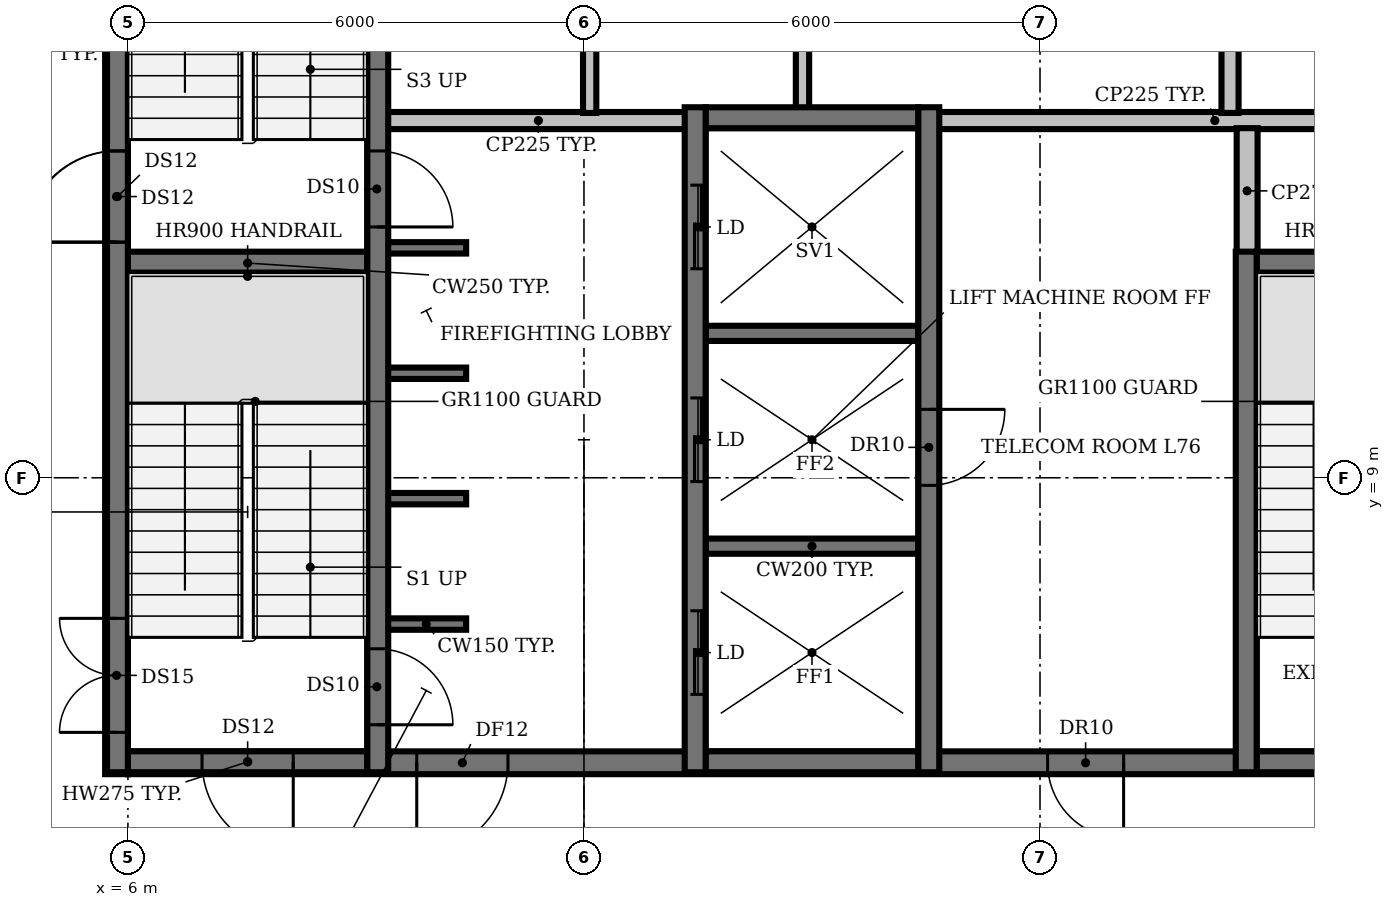
"""IFC4 building model, lengths in metres.
Left out: names, types, materials, properties, quantities, classifications, styles, units other than length and angle.
Written with IfcOpenShell. Run it as: python <this file> out.ifc"""

import sys

from ifc_helpers import new_model, si_unit, direction, frame, frame_2d, origin, place, context, subcontext, project, spatial, rectangle, extrude, element, fill, save


model = new_model("IFC4")
c1 = context("Model", 3, precision=1e-05, world=origin(), true_north=direction((0.0, 1.0)))
c2 = subcontext(c1, "Body", "Model", "MODEL_VIEW")
j1 = project(units=[si_unit("LENGTHUNIT", "METRE"), si_unit("PLANEANGLEUNIT", "RADIAN")], contexts=[c1])
p1 = place(None, origin())
s1 = spatial("IfcSite", under=j1, at=p1, CompositionType="ELEMENT")
p2 = place(p1, origin())
s2 = spatial("IfcBuilding", under=s1, at=p2, CompositionType="ELEMENT")
p3 = place(p2, frame((0.0, 0.0, 339.8)))
s3 = spatial("IfcBuildingStorey", under=s2, at=p3, CompositionType="ELEMENT", Elevation=339.8)
p4 = place(p3, frame((9.4, 7.075, 0.0), z_axis=(0.0, 0.0, 1.0), x_axis=(1.0, 0.0, 0.0)))
e1 = element("IfcWall", 1, at=p4, inside=s3, PredefinedType="SHEAR", context=c2, shape_type="SweptSolid", body=[
    extrude(rectangle(XDim=1.05, YDim=0.15, at=frame_2d((0.525, 0.0))), origin(), (0.0, 0.0, 1.0), 3.9),
])
p5 = place(p3, frame((13.6, 8.1, 0.0), z_axis=(0.0, 0.0, 1.0), x_axis=(1.0, 0.0, 0.0)))
e2 = element("IfcWall", 2, at=p5, inside=s3, PredefinedType="SHEAR", context=c2, shape_type="SweptSolid", body=[
    extrude(rectangle(XDim=2.8, YDim=0.2, at=frame_2d((1.4, 0.0))), origin(), (0.0, 0.0, 1.0), 3.9),
])
for number, where, z_axis, x_axis in (
    (3, (9.4, 8.725, 0.0), (0.0, 0.0, 1.0), (1.0, 0.0, 0.0)),
    (4, (9.4, 10.375, 0.0), (0.0, 0.0, 1.0), (1.0, 0.0, 0.0)),
):
    element("IfcWall", number, at=place(p3, frame(where, z_axis=z_axis, x_axis=x_axis)), inside=s3, PredefinedType="SHEAR", context=c2, shape_type="SweptSolid", body=[
        extrude(rectangle(XDim=1.05, YDim=0.15, at=frame_2d((0.525, 0.0))), origin(), (0.0, 0.0, 1.0), 3.9),
    ])
p6 = place(p3, frame((13.6, 10.9, 0.0), z_axis=(0.0, 0.0, 1.0), x_axis=(1.0, 0.0, 0.0)))
e5 = element("IfcWall", 5, at=p6, inside=s3, PredefinedType="SHEAR", context=c2, shape_type="SweptSolid", body=[
    extrude(rectangle(XDim=2.8, YDim=0.2, at=frame_2d((1.4, 0.0))), origin(), (0.0, 0.0, 1.0), 3.9),
])
for number, where, z_axis, x_axis in (
    (6, (6.0, 11.825, 0.0), (0.0, 0.0, 1.0), (1.0, 0.0, 0.0)),
    (7, (20.85, 11.825, 0.0), (0.0, 0.0, 1.0), (1.0, 0.0, 0.0)),
):
    element("IfcWall", number, at=place(p3, frame(where, z_axis=z_axis, x_axis=x_axis)), inside=s3, PredefinedType="SHEAR", context=c2, shape_type="SweptSolid", body=[
        extrude(rectangle(XDim=3.15, YDim=0.25, at=frame_2d((1.575, 0.0))), origin(), (0.0, 0.0, 1.0), 3.9),
    ])
p7 = place(p3, frame((9.4, 12.025, 0.0), z_axis=(0.0, 0.0, 1.0), x_axis=(1.0, 0.0, 0.0)))
e8 = element("IfcWall", 8, at=p7, inside=s3, PredefinedType="SHEAR", context=c2, shape_type="SweptSolid", body=[
    extrude(rectangle(XDim=1.05, YDim=0.15, at=frame_2d((0.525, 0.0))), origin(), (0.0, 0.0, 1.0), 3.9),
])
p8 = place(p3, frame((9.4, 13.7, 0.0), z_axis=(0.0, 0.0, 1.0), x_axis=(1.0, 0.0, 0.0)))
e9 = element("IfcWall", 9, at=p8, inside=s3, PredefinedType="PARTITIONING", context=c2, shape_type="SweptSolid", body=[
    extrude(rectangle(XDim=4.0, YDim=0.225, at=frame_2d((2.0, 0.0))), origin(), (0.0, 0.0, 1.0), 3.9),
])
p9 = place(p3, frame((13.6, 13.7, 0.0), z_axis=(0.0, 0.0, 1.0), x_axis=(1.0, 0.0, 0.0)))
e10 = element("IfcWall", 10, at=p9, inside=s3, PredefinedType="SHEAR", context=c2, shape_type="SweptSolid", body=[
    extrude(rectangle(XDim=2.8, YDim=0.2, at=frame_2d((1.4, 0.0))), origin(), (0.0, 0.0, 1.0), 3.9),
])
p10 = place(p3, frame((16.6, 13.7, 0.0), z_axis=(0.0, 0.0, 1.0), x_axis=(1.0, 0.0, 0.0)))
e11 = element("IfcWall", 11, at=p10, inside=s3, PredefinedType="PARTITIONING", context=c2, shape_type="SweptSolid", body=[
    extrude(rectangle(XDim=7.4, YDim=0.225, at=frame_2d((3.7, 0.0))), origin(), (0.0, 0.0, 1.0), 3.9),
])
p11 = place(p3, frame((9.275, 11.825, 0.0), z_axis=(0.0, 0.0, 1.0), x_axis=(0.0, -1.0, 0.0)))
e12 = element("IfcWall", 12, at=p11, inside=s3, PredefinedType="SHEAR", context=c2, shape_type="SweptSolid", body=[
    extrude(rectangle(XDim=6.425, YDim=0.25, at=frame_2d((3.212, 0.0))), origin(), (0.0, 0.0, 1.0), 3.9),
])
p12 = place(p11, frame((5.075, 0.0, 0.0)))
e13 = element("IfcOpeningElement", 13, at=p12, cuts=e12, PredefinedType="OPENING", context=c2, shape_type="SweptSolid", body=[
    extrude(rectangle(XDim=1.0, YDim=2.1, at=frame_2d((0.5, 1.05))), frame((0.0, 0.135, 0.0), z_axis=(0.0, -1.0, 0.0), x_axis=(1.0, 0.0, 0.0)), (0.0, 0.0, 1.0), 0.27),
])
p13 = place(p3, frame((9.275, 18.375, 0.0), z_axis=(0.0, 0.0, 1.0), x_axis=(0.0, -1.0, 0.0)))
e14 = element("IfcWall", 14, at=p13, inside=s3, PredefinedType="SHEAR", context=c2, shape_type="SweptSolid", body=[
    extrude(rectangle(XDim=6.55, YDim=0.25, at=frame_2d((3.275, 0.0))), origin(), (0.0, 0.0, 1.0), 3.9),
])
p14 = place(p13, frame((5.075, 0.0, 0.0)))
e15 = element("IfcOpeningElement", 15, at=p14, cuts=e14, PredefinedType="OPENING", context=c2, shape_type="SweptSolid", body=[
    extrude(rectangle(XDim=1.0, YDim=2.1, at=frame_2d((0.5, 1.05))), frame((0.0, 0.135, 0.0), z_axis=(0.0, -1.0, 0.0), x_axis=(1.0, 0.0, 0.0)), (0.0, 0.0, 1.0), 0.27),
])
p15 = place(p3, frame((12.075, 13.8, 0.0), z_axis=(0.0, 0.0, 1.0), x_axis=(0.0, 1.0, 0.0)))
e16 = element("IfcWall", 16, at=p15, inside=s3, PredefinedType="PARTITIONING", context=c2, shape_type="SweptSolid", body=[
    extrude(rectangle(XDim=2.6, YDim=0.175, at=frame_2d((1.3, 0.0))), origin(), (0.0, 0.0, 1.0), 3.9),
])
p16 = place(p3, frame((13.5, 5.4, 0.0), z_axis=(0.0, 0.0, 1.0), x_axis=(0.0, 1.0, 0.0)))
e17 = element("IfcWall", 17, at=p16, inside=s3, PredefinedType="SHEAR", context=c2, shape_type="SweptSolid", body=[
    extrude(rectangle(XDim=8.2, YDim=0.2, at=frame_2d((4.1, 0.0))), origin(), (0.0, 0.0, 1.0), 3.9),
])
p17 = place(p16, frame((0.75, 0.0, 0.0)))
e18 = element("IfcOpeningElement", 18, at=p17, cuts=e17, PredefinedType="OPENING", context=c2, shape_type="SweptSolid", body=[
    extrude(rectangle(XDim=1.1, YDim=2.1, at=frame_2d((0.55, 1.05))), frame((0.0, 0.11, 0.0), z_axis=(0.0, -1.0, 0.0), x_axis=(1.0, 0.0, 0.0)), (0.0, 0.0, 1.0), 0.22),
])
p18 = place(p16, frame((3.55, 0.0, 0.0)))
e19 = element("IfcOpeningElement", 19, at=p18, cuts=e17, PredefinedType="OPENING", context=c2, shape_type="SweptSolid", body=[
    extrude(rectangle(XDim=1.1, YDim=2.1, at=frame_2d((0.55, 1.05))), frame((0.0, 0.11, 0.0), z_axis=(0.0, -1.0, 0.0), x_axis=(1.0, 0.0, 0.0)), (0.0, 0.0, 1.0), 0.22),
])
p19 = place(p16, frame((6.35, 0.0, 0.0)))
e20 = element("IfcOpeningElement", 20, at=p19, cuts=e17, PredefinedType="OPENING", context=c2, shape_type="SweptSolid", body=[
    extrude(rectangle(XDim=1.1, YDim=2.1, at=frame_2d((0.55, 1.05))), frame((0.0, 0.11, 0.0), z_axis=(0.0, -1.0, 0.0), x_axis=(1.0, 0.0, 0.0)), (0.0, 0.0, 1.0), 0.22),
])
p20 = place(p3, frame((14.875, 13.8, 0.0), z_axis=(0.0, 0.0, 1.0), x_axis=(0.0, 1.0, 0.0)))
e21 = element("IfcWall", 21, at=p20, inside=s3, PredefinedType="PARTITIONING", context=c2, shape_type="SweptSolid", body=[
    extrude(rectangle(XDim=2.6, YDim=0.175, at=frame_2d((1.3, 0.0))), origin(), (0.0, 0.0, 1.0), 3.9),
])
p21 = place(p3, frame((16.5, 5.4, 0.0), z_axis=(0.0, 0.0, 1.0), x_axis=(0.0, 1.0, 0.0)))
e22 = element("IfcWall", 22, at=p21, inside=s3, PredefinedType="SHEAR", context=c2, shape_type="SweptSolid", body=[
    extrude(rectangle(XDim=8.2, YDim=0.2, at=frame_2d((4.1, 0.0))), origin(), (0.0, 0.0, 1.0), 3.9),
])
p22 = place(p3, frame((20.5, 13.8, 0.0), z_axis=(0.0, 0.0, 1.0), x_axis=(0.0, 1.0, 0.0)))
e23 = element("IfcWall", 23, at=p22, inside=s3, PredefinedType="PARTITIONING", context=c2, shape_type="SweptSolid", body=[
    extrude(rectangle(XDim=2.6, YDim=0.225, at=frame_2d((1.3, 0.0))), origin(), (0.0, 0.0, 1.0), 3.9),
])
p23 = place(p3, frame((20.725, 5.4, 0.0), z_axis=(0.0, 0.0, 1.0), x_axis=(0.0, 1.0, 0.0)))
e24 = element("IfcWall", 24, at=p23, inside=s3, PredefinedType="SHEAR", context=c2, shape_type="SweptSolid", body=[
    extrude(rectangle(XDim=6.3, YDim=0.25, at=frame_2d((3.15, 0.0))), origin(), (0.0, 0.0, 1.0), 3.9),
])
p24 = place(p3, frame((20.725, 11.95, 0.0), z_axis=(0.0, 0.0, 1.0), x_axis=(0.0, 1.0, 0.0)))
e25 = element("IfcWall", 25, at=p24, inside=s3, PredefinedType="PARTITIONING", context=c2, shape_type="SweptSolid", body=[
    extrude(rectangle(XDim=1.65, YDim=0.275, at=frame_2d((0.825, 0.0))), origin(), (0.0, 0.0, 1.0), 3.9),
])
p25 = place(p3, frame((5.85, 5.1, 0.0), z_axis=(0.0, 0.0, 1.0), x_axis=(0.0, 1.0, 0.0)))
e26 = element("IfcWall", 26, at=p25, inside=s3, PredefinedType="SHEAR", context=c2, shape_type="SweptSolid", body=[
    extrude(rectangle(XDim=20.0, YDim=0.3, at=frame_2d((10.0, 0.0))), origin(), (0.0, 0.0, 1.0), 3.9),
])
p26 = place(p25, frame((0.55, 0.0, 0.0)))
e27 = element("IfcOpeningElement", 27, at=p26, cuts=e26, PredefinedType="OPENING", context=c2, shape_type="SweptSolid", body=[
    extrude(rectangle(XDim=1.5, YDim=2.1, at=frame_2d((0.75, 1.05))), frame((0.0, 0.16, 0.0), z_axis=(0.0, -1.0, 0.0), x_axis=(1.0, 0.0, 0.0)), (0.0, 0.0, 1.0), 0.32),
])
p27 = place(p25, frame((7.0, 0.0, 0.0)))
e28 = element("IfcOpeningElement", 28, at=p27, cuts=e26, PredefinedType="OPENING", context=c2, shape_type="SweptSolid", body=[
    extrude(rectangle(XDim=1.2, YDim=2.1, at=frame_2d((0.6, 1.05))), frame((0.0, 0.16, 0.0), z_axis=(0.0, -1.0, 0.0), x_axis=(1.0, 0.0, 0.0)), (0.0, 0.0, 1.0), 0.32),
])
p28 = place(p25, frame((13.55, 0.0, 0.0)))
e29 = element("IfcOpeningElement", 29, at=p28, cuts=e26, PredefinedType="OPENING", context=c2, shape_type="SweptSolid", body=[
    extrude(rectangle(XDim=1.2, YDim=2.1, at=frame_2d((0.6, 1.05))), frame((0.0, 0.16, 0.0), z_axis=(0.0, -1.0, 0.0), x_axis=(1.0, 0.0, 0.0)), (0.0, 0.0, 1.0), 0.32),
])
p29 = place(p3, frame((24.0, 5.25, 0.0), z_axis=(0.0, 0.0, 1.0), x_axis=(-1.0, 0.0, 0.0)))
e30 = element("IfcWall", 30, at=p29, inside=s3, PredefinedType="SHEAR", context=c2, shape_type="SweptSolid", body=[
    extrude(rectangle(XDim=18.0, YDim=0.3, at=frame_2d((9.0, 0.0))), origin(), (0.0, 0.0, 1.0), 3.9),
])
p30 = place(p29, frame((13.0, 0.0, 0.0)))
e31 = element("IfcOpeningElement", 31, at=p30, cuts=e30, PredefinedType="OPENING", context=c2, shape_type="SweptSolid", body=[
    extrude(rectangle(XDim=1.2, YDim=2.1, at=frame_2d((0.6, 1.05))), frame((0.0, 0.16, 0.0), z_axis=(0.0, -1.0, 0.0), x_axis=(1.0, 0.0, 0.0)), (0.0, 0.0, 1.0), 0.32),
])
p31 = place(p29, frame((4.9, 0.0, 0.0)))
e32 = element("IfcOpeningElement", 32, at=p31, cuts=e30, PredefinedType="OPENING", context=c2, shape_type="SweptSolid", body=[
    extrude(rectangle(XDim=1.0, YDim=2.1, at=frame_2d((0.5, 1.05))), frame((0.0, 0.16, 0.0), z_axis=(0.0, -1.0, 0.0), x_axis=(1.0, 0.0, 0.0)), (0.0, 0.0, 1.0), 0.32),
])
p32 = place(p3, frame((9.15, 5.263, 4.2), z_axis=(0.0, 0.0, 1.0), x_axis=(-1.0, 0.0, 0.0)))
e33 = element("IfcWall", 33, at=p32, inside=s3, PredefinedType="SHEAR", context=c2, shape_type="SweptSolid", body=[
    extrude(rectangle(XDim=3.15, YDim=0.275, at=frame_2d((1.575, 0.0))), origin(), (0.0, 0.0, 1.0), 3.0),
])
p33 = place(p32, frame((0.975, 0.0, 0.0)))
e34 = element("IfcOpeningElement", 34, at=p33, cuts=e33, PredefinedType="OPENING", context=c2, shape_type="SweptSolid", body=[
    extrude(rectangle(XDim=1.2, YDim=2.1, at=frame_2d((0.6, 1.05))), frame((0.0, 0.147, 0.0), z_axis=(0.0, -1.0, 0.0), x_axis=(1.0, 0.0, 0.0)), (0.0, 0.0, 1.0), 0.295),
])
p34 = place(p3, frame((13.6, 5.263, 4.2), z_axis=(0.0, 0.0, 1.0), x_axis=(1.0, 0.0, 0.0)))
e35 = element("IfcWall", 35, at=p34, inside=s3, PredefinedType="SHEAR", context=c2, shape_type="SweptSolid", body=[
    extrude(rectangle(XDim=2.8, YDim=0.275, at=frame_2d((1.4, 0.0))), origin(), (0.0, 0.0, 1.0), 3.0),
])
p35 = place(p3, frame((24.0, 5.263, 4.2), z_axis=(0.0, 0.0, 1.0), x_axis=(-1.0, 0.0, 0.0)))
e36 = element("IfcWall", 36, at=p35, inside=s3, PredefinedType="SHEAR", context=c2, shape_type="SweptSolid", body=[
    extrude(rectangle(XDim=3.15, YDim=0.275, at=frame_2d((1.575, 0.0))), origin(), (0.0, 0.0, 1.0), 3.0),
])
p36 = place(p35, frame((0.975, 0.0, 0.0)))
e37 = element("IfcOpeningElement", 37, at=p36, cuts=e36, PredefinedType="OPENING", context=c2, shape_type="SweptSolid", body=[
    extrude(rectangle(XDim=1.2, YDim=2.1, at=frame_2d((0.6, 1.05))), frame((0.0, 0.147, 0.0), z_axis=(0.0, -1.0, 0.0), x_axis=(1.0, 0.0, 0.0)), (0.0, 0.0, 1.0), 0.295),
])
for number, where, z_axis, x_axis in (
    (38, (6.0, 11.837, 4.2), (0.0, 0.0, 1.0), (1.0, 0.0, 0.0)),
    (39, (20.85, 11.837, 4.2), (0.0, 0.0, 1.0), (1.0, 0.0, 0.0)),
):
    element("IfcWall", number, at=place(p3, frame(where, z_axis=z_axis, x_axis=x_axis)), inside=s3, PredefinedType="SHEAR", context=c2, shape_type="SweptSolid", body=[
        extrude(rectangle(XDim=3.15, YDim=0.275, at=frame_2d((1.575, 0.0))), origin(), (0.0, 0.0, 1.0), 3.0),
    ])
p37 = place(p3, frame((13.6, 13.737, 4.2), z_axis=(0.0, 0.0, 1.0), x_axis=(1.0, 0.0, 0.0)))
e40 = element("IfcWall", 40, at=p37, inside=s3, PredefinedType="SHEAR", context=c2, shape_type="SweptSolid", body=[
    extrude(rectangle(XDim=2.8, YDim=0.275, at=frame_2d((1.4, 0.0))), origin(), (0.0, 0.0, 1.0), 3.0),
])
p38 = place(p3, frame((5.862, 5.125, 4.2), z_axis=(0.0, 0.0, 1.0), x_axis=(0.0, 1.0, 0.0)))
e41 = element("IfcWall", 41, at=p38, inside=s3, PredefinedType="SHEAR", context=c2, shape_type="SweptSolid", body=[
    extrude(rectangle(XDim=19.95, YDim=0.275, at=frame_2d((9.975, 0.0))), origin(), (0.0, 0.0, 1.0), 3.0),
])
p39 = place(p38, frame((6.975, 0.0, 0.0)))
e42 = element("IfcOpeningElement", 42, at=p39, cuts=e41, PredefinedType="OPENING", context=c2, shape_type="SweptSolid", body=[
    extrude(rectangle(XDim=1.2, YDim=2.1, at=frame_2d((0.6, 1.05))), frame((0.0, 0.147, 0.0), z_axis=(0.0, -1.0, 0.0), x_axis=(1.0, 0.0, 0.0)), (0.0, 0.0, 1.0), 0.295),
])
p40 = place(p38, frame((13.525, 0.0, 0.0)))
e43 = element("IfcOpeningElement", 43, at=p40, cuts=e41, PredefinedType="OPENING", context=c2, shape_type="SweptSolid", body=[
    extrude(rectangle(XDim=1.2, YDim=2.1, at=frame_2d((0.6, 1.05))), frame((0.0, 0.147, 0.0), z_axis=(0.0, -1.0, 0.0), x_axis=(1.0, 0.0, 0.0)), (0.0, 0.0, 1.0), 0.295),
])
p41 = place(p3, frame((9.287, 5.125, 4.2), z_axis=(0.0, 0.0, 1.0), x_axis=(0.0, 1.0, 0.0)))
e44 = element("IfcWall", 44, at=p41, inside=s3, PredefinedType="SHEAR", context=c2, shape_type="SweptSolid", body=[
    extrude(rectangle(XDim=19.95, YDim=0.275, at=frame_2d((9.975, 0.0))), origin(), (0.0, 0.0, 1.0), 3.0),
])
p42 = place(p3, frame((13.463, 5.125, 4.2), z_axis=(0.0, 0.0, 1.0), x_axis=(0.0, 1.0, 0.0)))
e45 = element("IfcWall", 45, at=p42, inside=s3, PredefinedType="SHEAR", context=c2, shape_type="SweptSolid", body=[
    extrude(rectangle(XDim=8.75, YDim=0.275, at=frame_2d((4.375, 0.0))), origin(), (0.0, 0.0, 1.0), 3.0),
])
p43 = place(p3, frame((16.537, 13.875, 4.2), z_axis=(0.0, 0.0, 1.0), x_axis=(0.0, -1.0, 0.0)))
e46 = element("IfcWall", 46, at=p43, inside=s3, PredefinedType="SHEAR", context=c2, shape_type="SweptSolid", body=[
    extrude(rectangle(XDim=8.75, YDim=0.275, at=frame_2d((4.375, 0.0))), origin(), (0.0, 0.0, 1.0), 3.0),
])
p44 = place(p43, frame((3.975, 0.0, 0.0)))
e47 = element("IfcOpeningElement", 47, at=p44, cuts=e46, PredefinedType="OPENING", context=c2, shape_type="SweptSolid", body=[
    extrude(rectangle(XDim=1.0, YDim=2.1, at=frame_2d((0.5, 1.05))), frame((0.0, 0.147, 0.0), z_axis=(0.0, -1.0, 0.0), x_axis=(1.0, 0.0, 0.0)), (0.0, 0.0, 1.0), 0.295),
])
p45 = place(p3, frame((20.713, 5.125, 4.2), z_axis=(0.0, 0.0, 1.0), x_axis=(0.0, 1.0, 0.0)))
e48 = element("IfcWall", 48, at=p45, inside=s3, PredefinedType="SHEAR", context=c2, shape_type="SweptSolid", body=[
    extrude(rectangle(XDim=6.85, YDim=0.275, at=frame_2d((3.425, 0.0))), origin(), (0.0, 0.0, 1.0), 3.0),
])
p46 = place(p12, origin())
e49 = element("IfcDoor", 49, at=p46, inside=s3, OperationType="SINGLE_SWING_RIGHT", PredefinedType="DOOR", context=c2, shape_type="SweptSolid", body=[
    extrude(rectangle(XDim=1.0, YDim=2.1, at=frame_2d((0.5, 1.05))), frame((0.0, 0.025, 0.0), z_axis=(0.0, -1.0, 0.0), x_axis=(1.0, 0.0, 0.0)), (0.0, 0.0, 1.0), 0.05),
])
fill(e13, e49)
p47 = place(p14, origin())
e50 = element("IfcDoor", 50, at=p47, inside=s3, OperationType="SINGLE_SWING_RIGHT", PredefinedType="DOOR", context=c2, shape_type="SweptSolid", body=[
    extrude(rectangle(XDim=1.0, YDim=2.1, at=frame_2d((0.5, 1.05))), frame((0.0, 0.025, 0.0), z_axis=(0.0, -1.0, 0.0), x_axis=(1.0, 0.0, 0.0)), (0.0, 0.0, 1.0), 0.05),
])
fill(e15, e50)
p48 = place(p17, origin())
e51 = element("IfcDoor", 51, at=p48, inside=s3, OperationType="DOUBLE_DOOR_SLIDING", PredefinedType="DOOR", context=c2, shape_type="SweptSolid", body=[
    extrude(rectangle(XDim=1.1, YDim=2.1, at=frame_2d((0.55, 1.05))), frame((0.0, 0.025, 0.0), z_axis=(0.0, -1.0, 0.0), x_axis=(1.0, 0.0, 0.0)), (0.0, 0.0, 1.0), 0.05),
])
fill(e18, e51)
p49 = place(p18, origin())
e52 = element("IfcDoor", 52, at=p49, inside=s3, OperationType="DOUBLE_DOOR_SLIDING", PredefinedType="DOOR", context=c2, shape_type="SweptSolid", body=[
    extrude(rectangle(XDim=1.1, YDim=2.1, at=frame_2d((0.55, 1.05))), frame((0.0, 0.025, 0.0), z_axis=(0.0, -1.0, 0.0), x_axis=(1.0, 0.0, 0.0)), (0.0, 0.0, 1.0), 0.05),
])
fill(e19, e52)
p50 = place(p19, origin())
e53 = element("IfcDoor", 53, at=p50, inside=s3, OperationType="DOUBLE_DOOR_SLIDING", PredefinedType="DOOR", context=c2, shape_type="SweptSolid", body=[
    extrude(rectangle(XDim=1.1, YDim=2.1, at=frame_2d((0.55, 1.05))), frame((0.0, 0.025, 0.0), z_axis=(0.0, -1.0, 0.0), x_axis=(1.0, 0.0, 0.0)), (0.0, 0.0, 1.0), 0.05),
])
fill(e20, e53)
p51 = place(p26, origin())
e54 = element("IfcDoor", 54, at=p51, inside=s3, OperationType="DOUBLE_DOOR_SINGLE_SWING", PredefinedType="DOOR", context=c2, shape_type="SweptSolid", body=[
    extrude(rectangle(XDim=1.5, YDim=2.1, at=frame_2d((0.75, 1.05))), frame((0.0, 0.025, 0.0), z_axis=(0.0, -1.0, 0.0), x_axis=(1.0, 0.0, 0.0)), (0.0, 0.0, 1.0), 0.05),
])
fill(e27, e54)
p52 = place(p27, origin())
e55 = element("IfcDoor", 55, at=p52, inside=s3, OperationType="SINGLE_SWING_LEFT", PredefinedType="DOOR", context=c2, shape_type="SweptSolid", body=[
    extrude(rectangle(XDim=1.2, YDim=2.1, at=frame_2d((0.6, 1.05))), frame((0.0, 0.025, 0.0), z_axis=(0.0, -1.0, 0.0), x_axis=(1.0, 0.0, 0.0)), (0.0, 0.0, 1.0), 0.05),
])
fill(e28, e55)
p53 = place(p30, origin())
e56 = element("IfcDoor", 56, at=p53, inside=s3, OperationType="SINGLE_SWING_RIGHT", PredefinedType="DOOR", context=c2, shape_type="SweptSolid", body=[
    extrude(rectangle(XDim=1.2, YDim=2.1, at=frame_2d((0.6, 1.05))), frame((0.0, 0.025, 0.0), z_axis=(0.0, -1.0, 0.0), x_axis=(1.0, 0.0, 0.0)), (0.0, 0.0, 1.0), 0.05),
])
fill(e31, e56)
p54 = place(p31, origin())
e57 = element("IfcDoor", 57, at=p54, inside=s3, OperationType="SINGLE_SWING_LEFT", PredefinedType="DOOR", context=c2, shape_type="SweptSolid", body=[
    extrude(rectangle(XDim=1.0, YDim=2.1, at=frame_2d((0.5, 1.05))), frame((0.0, 0.025, 0.0), z_axis=(0.0, -1.0, 0.0), x_axis=(1.0, 0.0, 0.0)), (0.0, 0.0, 1.0), 0.05),
])
fill(e32, e57)
p55 = place(p33, origin())
e58 = element("IfcDoor", 58, at=p55, inside=s3, OperationType="SINGLE_SWING_LEFT", PredefinedType="DOOR", context=c2, shape_type="SweptSolid", body=[
    extrude(rectangle(XDim=1.2, YDim=2.1, at=frame_2d((0.6, 1.05))), frame((0.0, 0.025, 0.0), z_axis=(0.0, -1.0, 0.0), x_axis=(1.0, 0.0, 0.0)), (0.0, 0.0, 1.0), 0.05),
])
fill(e34, e58)
p56 = place(p39, origin())
e59 = element("IfcDoor", 59, at=p56, inside=s3, OperationType="SINGLE_SWING_LEFT", PredefinedType="DOOR", context=c2, shape_type="SweptSolid", body=[
    extrude(rectangle(XDim=1.2, YDim=2.1, at=frame_2d((0.6, 1.05))), frame((0.0, 0.025, 0.0), z_axis=(0.0, -1.0, 0.0), x_axis=(1.0, 0.0, 0.0)), (0.0, 0.0, 1.0), 0.05),
])
fill(e42, e59)
p57 = place(p44, origin())
e60 = element("IfcDoor", 60, at=p57, inside=s3, OperationType="SINGLE_SWING_LEFT", PredefinedType="DOOR", context=c2, shape_type="SweptSolid", body=[
    extrude(rectangle(XDim=1.0, YDim=2.1, at=frame_2d((0.5, 1.05))), frame((0.0, 0.025, 0.0), z_axis=(0.0, -1.0, 0.0), x_axis=(1.0, 0.0, 0.0)), (0.0, 0.0, 1.0), 0.05),
])
fill(e47, e60)
save(model, sys.argv[1])
